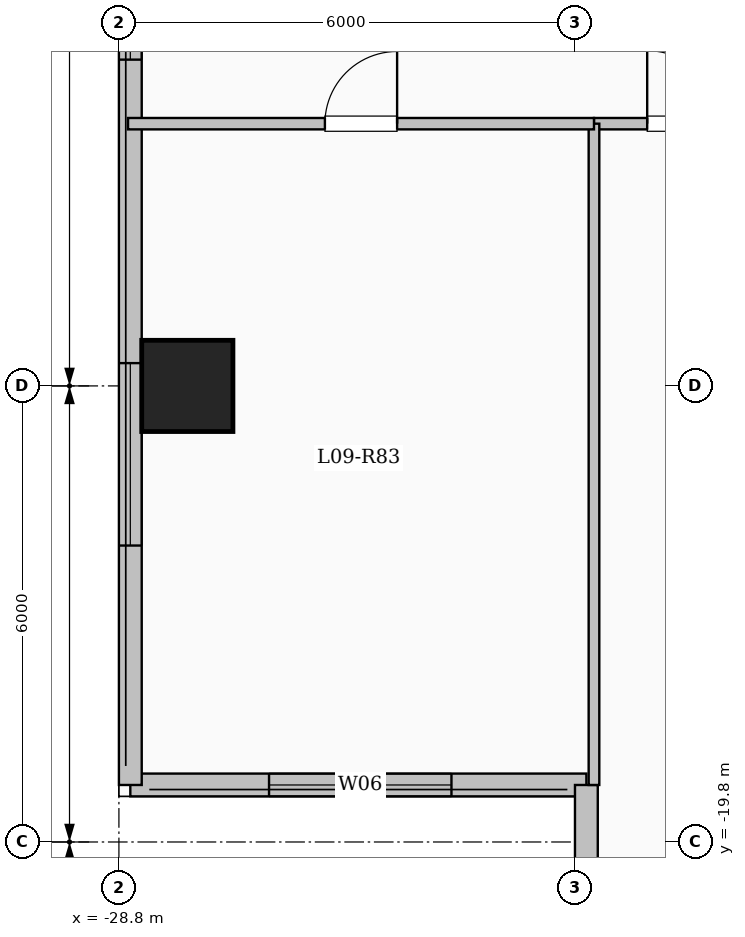
"""IFC4 building model, lengths in metres.
Left out: names, types, materials, properties, quantities, classifications, styles, units other than length and angle.
Written with IfcOpenShell. Run it as: python <this file> out.ifc"""

import sys

from ifc_helpers import new_model, si_unit, direction, frame, frame_2d, origin, origin_2d, place, context, subcontext, project, spatial, rectangle, extrude, element, fill, save


model = new_model("IFC4")
c1 = context("Model", 3, precision=1e-05, world=origin(), true_north=direction((0.0, 1.0)))
c2 = subcontext(c1, "Body", "Model", "MODEL_VIEW")
j1 = project(units=[si_unit("LENGTHUNIT", "METRE"), si_unit("PLANEANGLEUNIT", "RADIAN")], contexts=[c1])
p1 = place(None, origin())
s1 = spatial("IfcSite", under=j1, at=p1, CompositionType="ELEMENT")
p2 = place(p1, origin())
s2 = spatial("IfcBuilding", under=s1, at=p2, CompositionType="ELEMENT")
p3 = place(p2, frame((0.0, 0.0, 37.4)))
s3 = spatial("IfcBuildingStorey", under=s2, at=p3, CompositionType="ELEMENT", Elevation=37.4)
p4 = place(p3, frame((-27.9, -13.8, 0.0), z_axis=(0.0, 0.0, 1.0), x_axis=(1.0, 0.0, 0.0)))
e1 = element("IfcColumn", 1, at=p4, inside=s3, PredefinedType="COLUMN", context=c2, shape_type="SweptSolid", body=[
    extrude(rectangle(XDim=1.2, YDim=1.2, at=origin_2d()), origin(), (0.0, 0.0, 1.0), 3.35),
])
p5 = place(p3, frame((-22.65, -19.05, 0.0), z_axis=(0.0, 0.0, 1.0), x_axis=(-1.0, 0.0, 0.0)))
e2 = element("IfcWall", 2, at=p5, inside=s3, PredefinedType="SOLIDWALL", context=c2, shape_type="SweptSolid", body=[
    extrude(rectangle(XDim=6.0, YDim=0.3, at=frame_2d((3.0, 0.0))), origin(), (0.0, 0.0, 1.0), 3.1),
])
p6 = place(p5, frame((1.775, 0.0, 0.9)))
e3 = element("IfcOpeningElement", 3, at=p6, cuts=e2, PredefinedType="OPENING", context=c2, shape_type="SweptSolid", body=[
    extrude(rectangle(XDim=2.4, YDim=1.8, at=frame_2d((1.2, 0.9))), frame((0.0, 0.16, 0.0), z_axis=(0.0, -1.0, 0.0), x_axis=(1.0, 0.0, 0.0)), (0.0, 0.0, 1.0), 0.32),
])
p7 = place(p3, frame((-28.65, -19.05, 0.0), z_axis=(0.0, 0.0, 1.0), x_axis=(0.0, 1.0, 0.0)))
e4 = element("IfcWall", 4, at=p7, inside=s3, PredefinedType="SOLIDWALL", context=c2, shape_type="SweptSolid", body=[
    extrude(rectangle(XDim=38.1, YDim=0.3, at=frame_2d((19.05, 0.0))), origin(), (0.0, 0.0, 1.0), 3.1),
])
p8 = place(p7, frame((3.15, 0.0, 0.9)))
e5 = element("IfcOpeningElement", 5, at=p8, cuts=e4, PredefinedType="OPENING", context=c2, shape_type="SweptSolid", body=[
    extrude(rectangle(XDim=2.4, YDim=1.8, at=frame_2d((1.2, 0.9))), frame((0.0, 0.16, 0.0), z_axis=(0.0, -1.0, 0.0), x_axis=(1.0, 0.0, 0.0)), (0.0, 0.0, 1.0), 0.32),
])
p9 = place(p7, frame((9.542, 0.0, 0.9)))
e6 = element("IfcOpeningElement", 6, at=p9, cuts=e4, PredefinedType="OPENING", context=c2, shape_type="SweptSolid", body=[
    extrude(rectangle(XDim=1.5, YDim=1.65, at=frame_2d((0.75, 0.825))), frame((0.0, 0.16, 0.0), z_axis=(0.0, -1.0, 0.0), x_axis=(1.0, 0.0, 0.0)), (0.0, 0.0, 1.0), 0.32),
])
p10 = place(p7, frame((19.8, 0.0, 0.9)))
e7 = element("IfcOpeningElement", 7, at=p10, cuts=e4, PredefinedType="OPENING", context=c2, shape_type="SweptSolid", body=[
    extrude(rectangle(XDim=2.0, YDim=1.7, at=frame_2d((1.0, 0.85))), frame((0.0, 0.16, 0.0), z_axis=(0.0, -1.0, 0.0), x_axis=(1.0, 0.0, 0.0)), (0.0, 0.0, 1.0), 0.32),
])
p11 = place(p7, frame((30.175, 0.0, 0.95)))
e8 = element("IfcOpeningElement", 8, at=p11, cuts=e4, PredefinedType="OPENING", context=c2, shape_type="SweptSolid", body=[
    extrude(rectangle(XDim=1.0, YDim=1.5, at=frame_2d((0.5, 0.75))), frame((0.0, 0.16, 0.0), z_axis=(0.0, -1.0, 0.0), x_axis=(1.0, 0.0, 0.0)), (0.0, 0.0, 1.0), 0.32),
])
p12 = place(p7, frame((33.85, 0.0, 0.9)))
e9 = element("IfcOpeningElement", 9, at=p12, cuts=e4, PredefinedType="OPENING", context=c2, shape_type="SweptSolid", body=[
    extrude(rectangle(XDim=2.0, YDim=1.7, at=frame_2d((1.0, 0.85))), frame((0.0, 0.16, 0.0), z_axis=(0.0, -1.0, 0.0), x_axis=(1.0, 0.0, 0.0)), (0.0, 0.0, 1.0), 0.32),
])
p13 = place(p3, frame((-22.65, -23.55, 0.0), z_axis=(0.0, 0.0, 1.0), x_axis=(0.0, 1.0, 0.0)))
e10 = element("IfcWall", 10, at=p13, inside=s3, PredefinedType="SOLIDWALL", context=c2, shape_type="SweptSolid", body=[
    extrude(rectangle(XDim=4.5, YDim=0.3, at=frame_2d((2.25, 0.0))), origin(), (0.0, 0.0, 1.0), 3.1),
])
p14 = place(p13, frame((1.067, 0.0, 0.9)))
e11 = element("IfcOpeningElement", 11, at=p14, cuts=e10, PredefinedType="OPENING", context=c2, shape_type="SweptSolid", body=[
    extrude(rectangle(XDim=2.4, YDim=1.8, at=frame_2d((1.2, 0.9))), frame((0.0, 0.16, 0.0), z_axis=(0.0, -1.0, 0.0), x_axis=(1.0, 0.0, 0.0)), (0.0, 0.0, 1.0), 0.32),
])
p15 = place(p3, frame((-22.55, -10.35, 0.0), z_axis=(0.0, 0.0, 1.0), x_axis=(1.0, 0.0, 0.0)))
e12 = element("IfcWall", 12, at=p15, inside=s3, PredefinedType="PARTITIONING", context=c2, shape_type="SweptSolid", body=[
    extrude(rectangle(XDim=14.0, YDim=0.15, at=frame_2d((7.0, 0.0))), origin(), (0.0, 0.0, 1.0), 3.1),
])
p16 = place(p15, frame((0.7, 0.0, 0.0)))
e13 = element("IfcOpeningElement", 13, at=p16, cuts=e12, PredefinedType="OPENING", context=c2, shape_type="SweptSolid", body=[
    extrude(rectangle(XDim=0.96, YDim=2.15, at=frame_2d((0.48, 1.075))), frame((0.0, 0.085, 0.0), z_axis=(0.0, -1.0, 0.0), x_axis=(1.0, 0.0, 0.0)), (0.0, 0.0, 1.0), 0.17),
])
p17 = place(p15, frame((6.838, 0.0, 0.0)))
e14 = element("IfcOpeningElement", 14, at=p17, cuts=e12, PredefinedType="OPENING", context=c2, shape_type="SweptSolid", body=[
    extrude(rectangle(XDim=0.96, YDim=2.15, at=frame_2d((0.48, 1.075))), frame((0.0, 0.085, 0.0), z_axis=(0.0, -1.0, 0.0), x_axis=(1.0, 0.0, 0.0)), (0.0, 0.0, 1.0), 0.17),
])
p18 = place(p3, frame((-22.55, -19.05, 0.0), z_axis=(0.0, 0.0, 1.0), x_axis=(0.0, 1.0, 0.0)))
e15 = element("IfcWall", 15, at=p18, inside=s3, PredefinedType="PARTITIONING", context=c2, shape_type="SweptSolid", body=[
    extrude(rectangle(XDim=8.7, YDim=0.14, at=frame_2d((4.35, 0.0))), origin(), (0.0, 0.0, 1.0), 3.1),
])
p19 = place(p3, frame((-28.68, -10.35, 0.0), z_axis=(0.0, 0.0, 1.0), x_axis=(1.0, 0.0, 0.0)))
e16 = element("IfcWall", 16, at=p19, inside=s3, PredefinedType="PARTITIONING", context=c2, shape_type="SweptSolid", body=[
    extrude(rectangle(XDim=6.13, YDim=0.15, at=frame_2d((3.065, 0.0))), origin(), (0.0, 0.0, 1.0), 3.1),
])
p20 = place(p19, frame((2.59, 0.0, 0.0)))
e17 = element("IfcOpeningElement", 17, at=p20, cuts=e16, PredefinedType="OPENING", context=c2, shape_type="SweptSolid", body=[
    extrude(rectangle(XDim=0.95, YDim=2.15, at=frame_2d((0.475, 1.075))), frame((0.0, 0.085, 0.0), z_axis=(0.0, -1.0, 0.0), x_axis=(1.0, 0.0, 0.0)), (0.0, 0.0, 1.0), 0.17),
])
p21 = place(p6, origin())
e18 = element("IfcWindow", 18, at=p21, inside=s3, PartitioningType="SINGLE_PANEL", PredefinedType="WINDOW", context=c2, shape_type="SweptSolid", body=[
    extrude(rectangle(XDim=2.4, YDim=1.8, at=frame_2d((1.2, 0.9))), frame((0.0, 0.03, 0.0), z_axis=(0.0, -1.0, 0.0), x_axis=(1.0, 0.0, 0.0)), (0.0, 0.0, 1.0), 0.06),
])
fill(e3, e18)
p22 = place(p8, origin())
e19 = element("IfcWindow", 19, at=p22, inside=s3, PartitioningType="SINGLE_PANEL", PredefinedType="WINDOW", context=c2, shape_type="SweptSolid", body=[
    extrude(rectangle(XDim=2.4, YDim=1.8, at=frame_2d((1.2, 0.9))), frame((0.0, 0.03, 0.0), z_axis=(0.0, -1.0, 0.0), x_axis=(1.0, 0.0, 0.0)), (0.0, 0.0, 1.0), 0.06),
])
fill(e5, e19)
p23 = place(p9, origin())
e20 = element("IfcWindow", 20, at=p23, inside=s3, PartitioningType="SINGLE_PANEL", PredefinedType="WINDOW", context=c2, shape_type="SweptSolid", body=[
    extrude(rectangle(XDim=1.5, YDim=1.65, at=frame_2d((0.75, 0.825))), frame((0.0, 0.03, 0.0), z_axis=(0.0, -1.0, 0.0), x_axis=(1.0, 0.0, 0.0)), (0.0, 0.0, 1.0), 0.06),
])
fill(e6, e20)
p24 = place(p16, origin())
e21 = element("IfcDoor", 21, at=p24, inside=s3, OperationType="SINGLE_SWING_LEFT", PredefinedType="DOOR", context=c2, shape_type="SweptSolid", body=[
    extrude(rectangle(XDim=0.96, YDim=2.15, at=frame_2d((0.48, 1.075))), frame((0.0, 0.025, 0.0), z_axis=(0.0, -1.0, 0.0), x_axis=(1.0, 0.0, 0.0)), (0.0, 0.0, 1.0), 0.05),
])
fill(e13, e21)
p25 = place(p20, origin())
e22 = element("IfcDoor", 22, at=p25, inside=s3, OperationType="SINGLE_SWING_RIGHT", PredefinedType="DOOR", context=c2, shape_type="SweptSolid", body=[
    extrude(rectangle(XDim=0.95, YDim=2.15, at=frame_2d((0.475, 1.075))), frame((0.0, 0.025, 0.0), z_axis=(0.0, -1.0, 0.0), x_axis=(1.0, 0.0, 0.0)), (0.0, 0.0, 1.0), 0.05),
])
fill(e17, e22)
save(model, sys.argv[1])
